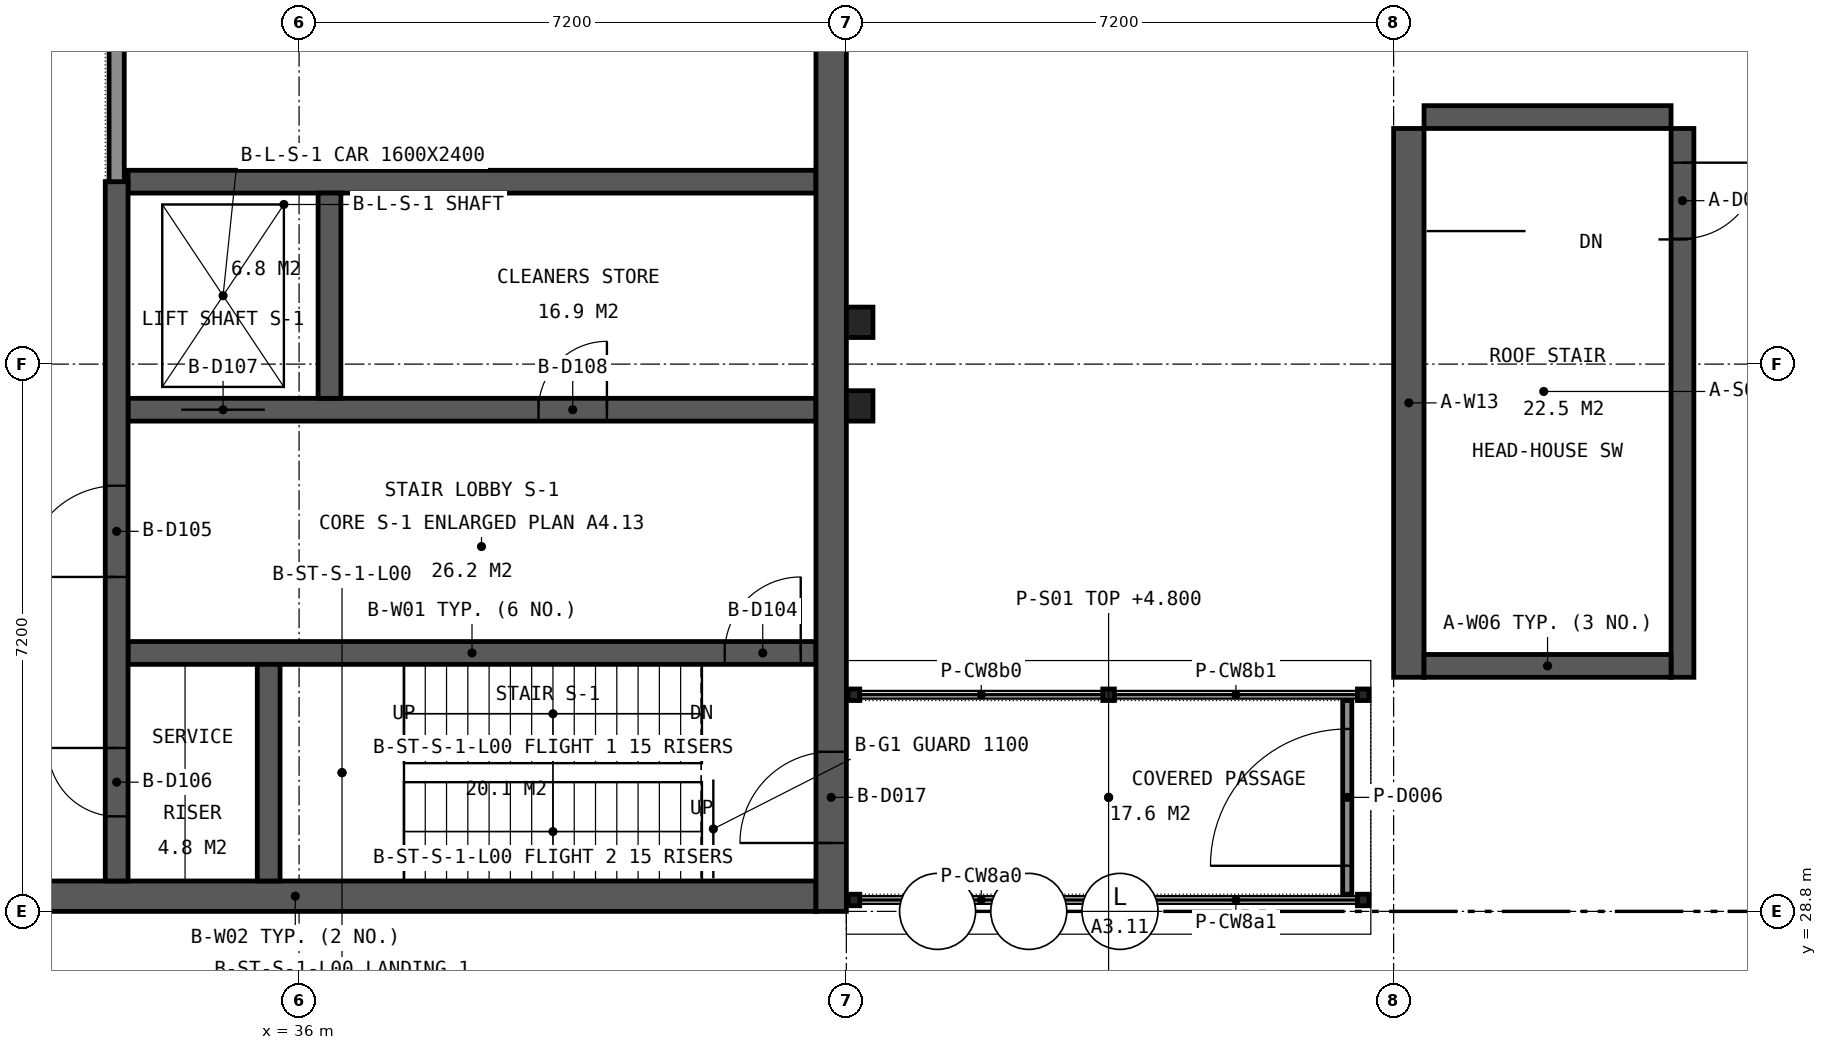
"""IFC4 building model, lengths in metres.
Left out: names, types, materials, properties, quantities, classifications, styles, units other than length and angle.
Written with IfcOpenShell. Run it as: python <this file> out.ifc"""

import sys

from ifc_helpers import new_model, si_unit, direction, frame, frame_2d, origin, origin_2d, place, context, subcontext, project, spatial, rectangle, hollow_rectangle, extrude, element, fill, save


model = new_model("IFC4")
c1 = context("Model", 3, precision=1e-05, world=origin(), true_north=direction((0.0, 1.0)))
c2 = subcontext(c1, "Body", "Model", "MODEL_VIEW")
j1 = project(units=[si_unit("LENGTHUNIT", "METRE"), si_unit("PLANEANGLEUNIT", "RADIAN")], contexts=[c1])
p1 = place(None, origin())
s1 = spatial("IfcSite", under=j1, at=p1, CompositionType="ELEMENT")
p2 = place(p1, origin())
s2 = spatial("IfcBuilding", under=s1, at=p2, CompositionType="ELEMENT")
p3 = place(p2, frame((0.0, 0.0, 4.8)))
s3 = spatial("IfcBuildingStorey", under=s2, at=p3, CompositionType="ELEMENT", Elevation=4.8)
p4 = place(p3, frame((50.6, 39.1, 0.0), z_axis=(0.0, 0.0, 1.0), x_axis=(0.0, -1.0, 0.0)))
e1 = element("IfcWall", 1, at=p4, inside=s3, PredefinedType="SHEAR", context=c2, shape_type="SweptSolid", body=[
    extrude(rectangle(XDim=7.22, YDim=0.4, at=frame_2d((3.61, 0.0))), origin(), (0.0, 0.0, 1.0), 2.5),
])
p5 = place(p3, frame((54.2, 39.1, 0.0), z_axis=(0.0, 0.0, 1.0), x_axis=(0.0, -1.0, 0.0)))
e2 = element("IfcWall", 2, at=p5, inside=s3, PredefinedType="SHEAR", context=c2, shape_type="SweptSolid", body=[
    extrude(rectangle(XDim=7.22, YDim=0.3, at=frame_2d((3.61, 0.0))), origin(), (0.0, 0.0, 1.0), 2.5),
])
p6 = place(p5, frame((0.45, 0.0, 0.0)))
e3 = element("IfcOpeningElement", 3, at=p6, cuts=e2, PredefinedType="OPENING", context=c2, shape_type="SweptSolid", body=[
    extrude(rectangle(XDim=1.0, YDim=2.1, at=frame_2d((0.5, 1.05))), frame((0.0, 0.16, 0.0), z_axis=(0.0, -1.0, 0.0), x_axis=(1.0, 0.0, 0.0)), (0.0, 0.0, 1.0), 0.32),
])
for number, where, z_axis, x_axis in (
    (4, (50.8, 32.03, 0.0), (0.0, 0.0, 1.0), (1.0, 0.0, 0.0)),
    (5, (50.8, 39.25, 0.0), (0.0, 0.0, 1.0), (1.0, 0.0, 0.0)),
):
    element("IfcWall", number, at=place(p3, frame(where, z_axis=z_axis, x_axis=x_axis)), inside=s3, PredefinedType="SHEAR", context=c2, shape_type="SweptSolid", body=[
        extrude(rectangle(XDim=3.25, YDim=0.3, at=frame_2d((1.625, 0.0))), origin(), (0.0, 0.0, 1.0), 2.5),
    ])
p7 = place(p3, frame((29.1, 29.0, 0.0), z_axis=(0.0, 0.0, 1.0), x_axis=(1.0, 0.0, 0.0)))
e6 = element("IfcWall", 6, at=p7, inside=s3, PredefinedType="SHEAR", context=c2, shape_type="SweptSolid", body=[
    extrude(rectangle(XDim=13.7, YDim=0.4, at=frame_2d((6.85, 0.0))), origin(), (0.0, 0.0, 1.0), 4.55),
])
p8 = place(p3, frame((33.75, 32.2, 0.0), z_axis=(0.0, 0.0, 1.0), x_axis=(1.0, 0.0, 0.0)))
e7 = element("IfcWall", 7, at=p8, inside=s3, PredefinedType="SHEAR", context=c2, shape_type="SweptSolid", body=[
    extrude(rectangle(XDim=9.05, YDim=0.3, at=frame_2d((4.525, 0.0))), origin(), (0.0, 0.0, 1.0), 4.55),
])
p9 = place(p8, frame((7.85, 0.0, 0.0)))
e8 = element("IfcOpeningElement", 8, at=p9, cuts=e7, PredefinedType="OPENING", context=c2, shape_type="SweptSolid", body=[
    extrude(rectangle(XDim=1.0, YDim=2.1, at=frame_2d((0.5, 1.05))), frame((0.0, 0.16, 0.0), z_axis=(0.0, -1.0, 0.0), x_axis=(1.0, 0.0, 0.0)), (0.0, 0.0, 1.0), 0.32),
])
p10 = place(p3, frame((33.75, 35.4, 0.0), z_axis=(0.0, 0.0, 1.0), x_axis=(1.0, 0.0, 0.0)))
e9 = element("IfcWall", 9, at=p10, inside=s3, PredefinedType="SHEAR", context=c2, shape_type="SweptSolid", body=[
    extrude(rectangle(XDim=9.05, YDim=0.3, at=frame_2d((4.525, 0.0))), origin(), (0.0, 0.0, 1.0), 4.55),
])
p11 = place(p10, frame((0.7, 0.0, 0.0)))
e10 = element("IfcOpeningElement", 10, at=p11, cuts=e9, PredefinedType="OPENING", context=c2, shape_type="SweptSolid", body=[
    extrude(rectangle(XDim=1.1, YDim=2.1, at=frame_2d((0.55, 1.05))), frame((0.0, 0.16, 0.0), z_axis=(0.0, -1.0, 0.0), x_axis=(1.0, 0.0, 0.0)), (0.0, 0.0, 1.0), 0.32),
])
p12 = place(p10, frame((5.4, 0.0, 0.0)))
e11 = element("IfcOpeningElement", 11, at=p12, cuts=e9, PredefinedType="OPENING", context=c2, shape_type="SweptSolid", body=[
    extrude(rectangle(XDim=0.9, YDim=2.1, at=frame_2d((0.45, 1.05))), frame((0.0, 0.16, 0.0), z_axis=(0.0, -1.0, 0.0), x_axis=(1.0, 0.0, 0.0)), (0.0, 0.0, 1.0), 0.32),
])
p13 = place(p3, frame((33.75, 38.4, 0.0), z_axis=(0.0, 0.0, 1.0), x_axis=(1.0, 0.0, 0.0)))
e12 = element("IfcWall", 12, at=p13, inside=s3, PredefinedType="SHEAR", context=c2, shape_type="SweptSolid", body=[
    extrude(rectangle(XDim=9.05, YDim=0.3, at=frame_2d((4.525, 0.0))), origin(), (0.0, 0.0, 1.0), 4.55),
])
p14 = place(p3, frame((33.6, 29.2, 0.0), z_axis=(0.0, 0.0, 1.0), x_axis=(0.0, 1.0, 0.0)))
e13 = element("IfcWall", 13, at=p14, inside=s3, PredefinedType="SHEAR", context=c2, shape_type="SweptSolid", body=[
    extrude(rectangle(XDim=9.2, YDim=0.3, at=frame_2d((4.6, 0.0))), origin(), (0.0, 0.0, 1.0), 4.55),
])
p15 = place(p14, frame((4.0, 0.0, 0.0)))
e14 = element("IfcOpeningElement", 14, at=p15, cuts=e13, PredefinedType="OPENING", context=c2, shape_type="SweptSolid", body=[
    extrude(rectangle(XDim=1.2, YDim=2.1, at=frame_2d((0.6, 1.05))), frame((0.0, 0.16, 0.0), z_axis=(0.0, -1.0, 0.0), x_axis=(1.0, 0.0, 0.0)), (0.0, 0.0, 1.0), 0.32),
])
p16 = place(p14, frame((0.85, 0.0, 0.0)))
e15 = element("IfcOpeningElement", 15, at=p16, cuts=e13, PredefinedType="OPENING", context=c2, shape_type="SweptSolid", body=[
    extrude(rectangle(XDim=0.9, YDim=2.1, at=frame_2d((0.45, 1.05))), frame((0.0, 0.16, 0.0), z_axis=(0.0, -1.0, 0.0), x_axis=(1.0, 0.0, 0.0)), (0.0, 0.0, 1.0), 0.32),
])
p17 = place(p3, frame((35.6, 29.2, 0.0), z_axis=(0.0, 0.0, 1.0), x_axis=(0.0, 1.0, 0.0)))
e16 = element("IfcWall", 16, at=p17, inside=s3, PredefinedType="SHEAR", context=c2, shape_type="SweptSolid", body=[
    extrude(rectangle(XDim=2.85, YDim=0.3, at=frame_2d((1.425, 0.0))), origin(), (0.0, 0.0, 1.0), 4.55),
])
p18 = place(p3, frame((36.4, 35.55, 0.0), z_axis=(0.0, 0.0, 1.0), x_axis=(0.0, 1.0, 0.0)))
e17 = element("IfcWall", 17, at=p18, inside=s3, PredefinedType="SHEAR", context=c2, shape_type="SweptSolid", body=[
    extrude(rectangle(XDim=2.7, YDim=0.3, at=frame_2d((1.35, 0.0))), origin(), (0.0, 0.0, 1.0), 4.55),
])
p19 = place(p3, frame((43.0, 28.8, 0.0), z_axis=(0.0, 0.0, 1.0), x_axis=(0.0, 1.0, 0.0)))
e18 = element("IfcWall", 18, at=p19, inside=s3, PredefinedType="SHEAR", context=c2, shape_type="SweptSolid", body=[
    extrude(rectangle(XDim=14.1, YDim=0.4, at=frame_2d((7.05, 0.0))), origin(), (0.0, 0.0, 1.0), 4.55),
])
p20 = place(p19, frame((0.9, 0.0, 0.0)))
e19 = element("IfcOpeningElement", 19, at=p20, cuts=e18, PredefinedType="OPENING", context=c2, shape_type="SweptSolid", body=[
    extrude(rectangle(XDim=1.2, YDim=2.1, at=frame_2d((0.6, 1.05))), frame((0.0, 0.21, 0.0), z_axis=(0.0, -1.0, 0.0), x_axis=(1.0, 0.0, 0.0)), (0.0, 0.0, 1.0), 0.42),
])
for number, where, z_axis, x_axis in (
    (20, (43.3, 28.95, 0.0), (0.0, 0.0, 1.0), (1.0, 0.0, 0.0)),
    (21, (46.65, 28.95, 0.0), (0.0, 0.0, 1.0), (1.0, 0.0, 0.0)),
    (22, (50.0, 28.95, 0.0), (0.0, 0.0, 1.0), (1.0, 0.0, 0.0)),
    (23, (43.3, 31.65, 0.0), (0.0, 0.0, 1.0), (1.0, 0.0, 0.0)),
    (24, (46.65, 31.65, 0.0), (0.0, 0.0, 1.0), (1.0, 0.0, 0.0)),
    (25, (50.0, 31.65, 0.0), (0.0, 0.0, 1.0), (1.0, 0.0, 0.0)),
):
    element("IfcColumn", number, at=place(p3, frame(where, z_axis=z_axis, x_axis=x_axis)), inside=s3, PredefinedType="COLUMN", context=c2, shape_type="SweptSolid", body=[
        extrude(hollow_rectangle(XDim=0.152, YDim=0.152, WallThickness=0.01, at=origin_2d()), origin(), (0.0, 0.0, 1.0), 2.753),
    ])
for number, where, z_axis, x_axis in (
    (26, (43.375, 35.45, 0.0), (0.0, 0.0, 1.0), (1.0, 0.0, 0.0)),
    (27, (43.375, 36.55, 0.0), (0.0, 0.0, 1.0), (1.0, 0.0, 0.0)),
):
    element("IfcColumn", number, at=place(p3, frame(where, z_axis=z_axis, x_axis=x_axis)), inside=s3, PredefinedType="COLUMN", context=c2, shape_type="SweptSolid", body=[
        extrude(rectangle(XDim=0.35, YDim=0.4, at=origin_2d()), origin(), (0.0, 0.0, 1.0), 4.8),
    ])
p21 = place(p3, frame((49.79, 29.026, 0.0), z_axis=(0.0, 0.0, 1.0), x_axis=(0.0, 1.0, 0.0)))
e28 = element("IfcWall", 28, at=p21, inside=s3, PredefinedType="SOLIDWALL", context=c2, shape_type="SweptSolid", body=[
    extrude(rectangle(XDim=2.548, YDim=0.12, at=frame_2d((1.274, 0.0))), origin(), (0.0, 0.0, 1.0), 2.753),
])
p22 = place(p21, frame((0.374, 0.0, 0.0)))
e29 = element("IfcOpeningElement", 29, at=p22, cuts=e28, PredefinedType="OPENING", context=c2, shape_type="SweptSolid", body=[
    extrude(rectangle(XDim=1.8, YDim=2.4, at=frame_2d((0.9, 1.2))), frame((0.0, 0.07, 0.0), z_axis=(0.0, -1.0, 0.0), x_axis=(1.0, 0.0, 0.0)), (0.0, 0.0, 1.0), 0.14),
])
p23 = place(p3, frame((33.6, 38.4, 0.0), z_axis=(0.0, 0.0, 1.0), x_axis=(0.0, 1.0, 0.0)))
e30 = element("IfcWall", 30, at=p23, inside=s3, PredefinedType="PARTITIONING", context=c2, shape_type="SweptSolid", body=[
    extrude(rectangle(XDim=24.0, YDim=0.2, at=frame_2d((12.0, 0.0))), origin(), (0.0, 0.0, 1.0), 3.95),
])
p24 = place(p23, frame((5.1, 0.0, 0.0)))
e31 = element("IfcOpeningElement", 31, at=p24, cuts=e30, PredefinedType="OPENING", context=c2, shape_type="SweptSolid", body=[
    extrude(rectangle(XDim=1.8, YDim=2.1, at=frame_2d((0.9, 1.05))), frame((0.0, 0.11, 0.0), z_axis=(0.0, -1.0, 0.0), x_axis=(1.0, 0.0, 0.0)), (0.0, 0.0, 1.0), 0.22),
])
p25 = place(p23, frame((13.3, 0.0, 0.0)))
e32 = element("IfcOpeningElement", 32, at=p25, cuts=e30, PredefinedType="OPENING", context=c2, shape_type="SweptSolid", body=[
    extrude(rectangle(XDim=1.0, YDim=2.1, at=frame_2d((0.5, 1.05))), frame((0.0, 0.11, 0.0), z_axis=(0.0, -1.0, 0.0), x_axis=(1.0, 0.0, 0.0)), (0.0, 0.0, 1.0), 0.22),
])
p26 = place(p23, frame((18.9, 0.0, 0.0)))
e33 = element("IfcOpeningElement", 33, at=p26, cuts=e30, PredefinedType="OPENING", context=c2, shape_type="SweptSolid", body=[
    extrude(rectangle(XDim=1.8, YDim=2.1, at=frame_2d((0.9, 1.05))), frame((0.0, 0.11, 0.0), z_axis=(0.0, -1.0, 0.0), x_axis=(1.0, 0.0, 0.0)), (0.0, 0.0, 1.0), 0.22),
])
p27 = place(p20, origin())
e34 = element("IfcDoor", 34, at=p27, inside=s3, OperationType="SINGLE_SWING_LEFT", PredefinedType="DOOR", context=c2, shape_type="SweptSolid", body=[
    extrude(rectangle(XDim=1.2, YDim=2.1, at=frame_2d((0.6, 1.05))), frame((0.0, 0.025, 0.0), z_axis=(0.0, -1.0, 0.0), x_axis=(1.0, 0.0, 0.0)), (0.0, 0.0, 1.0), 0.05),
])
fill(e19, e34)
p28 = place(p22, origin())
e35 = element("IfcDoor", 35, at=p28, inside=s3, OperationType="DOUBLE_DOOR_DOUBLE_SWING", PredefinedType="DOOR", context=c2, shape_type="SweptSolid", body=[
    extrude(rectangle(XDim=1.8, YDim=2.4, at=frame_2d((0.9, 1.2))), frame((0.0, 0.025, 0.0), z_axis=(0.0, -1.0, 0.0), x_axis=(1.0, 0.0, 0.0)), (0.0, 0.0, 1.0), 0.05),
])
fill(e29, e35)
p29 = place(p6, origin())
e36 = element("IfcDoor", 36, at=p29, inside=s3, OperationType="SINGLE_SWING_LEFT", PredefinedType="DOOR", context=c2, shape_type="SweptSolid", body=[
    extrude(rectangle(XDim=1.0, YDim=2.1, at=frame_2d((0.5, 1.05))), frame((0.0, 0.025, 0.0), z_axis=(0.0, -1.0, 0.0), x_axis=(1.0, 0.0, 0.0)), (0.0, 0.0, 1.0), 0.05),
])
fill(e3, e36)
p30 = place(p9, origin())
e37 = element("IfcDoor", 37, at=p30, inside=s3, OperationType="SINGLE_SWING_RIGHT", PredefinedType="DOOR", context=c2, shape_type="SweptSolid", body=[
    extrude(rectangle(XDim=1.0, YDim=2.1, at=frame_2d((0.5, 1.05))), frame((0.0, 0.025, 0.0), z_axis=(0.0, -1.0, 0.0), x_axis=(1.0, 0.0, 0.0)), (0.0, 0.0, 1.0), 0.05),
])
fill(e8, e37)
p31 = place(p15, origin())
e38 = element("IfcDoor", 38, at=p31, inside=s3, OperationType="SINGLE_SWING_LEFT", PredefinedType="DOOR", context=c2, shape_type="SweptSolid", body=[
    extrude(rectangle(XDim=1.2, YDim=2.1, at=frame_2d((0.6, 1.05))), frame((0.0, 0.025, 0.0), z_axis=(0.0, -1.0, 0.0), x_axis=(1.0, 0.0, 0.0)), (0.0, 0.0, 1.0), 0.05),
])
fill(e14, e38)
p32 = place(p16, origin())
e39 = element("IfcDoor", 39, at=p32, inside=s3, OperationType="SINGLE_SWING_RIGHT", PredefinedType="DOOR", context=c2, shape_type="SweptSolid", body=[
    extrude(rectangle(XDim=0.9, YDim=2.1, at=frame_2d((0.45, 1.05))), frame((0.0, 0.025, 0.0), z_axis=(0.0, -1.0, 0.0), x_axis=(1.0, 0.0, 0.0)), (0.0, 0.0, 1.0), 0.05),
])
fill(e15, e39)
p33 = place(p11, origin())
e40 = element("IfcDoor", 40, at=p33, inside=s3, OperationType="SLIDING_TO_LEFT", PredefinedType="DOOR", context=c2, shape_type="SweptSolid", body=[
    extrude(rectangle(XDim=1.1, YDim=2.1, at=frame_2d((0.55, 1.05))), frame((0.0, 0.025, 0.0), z_axis=(0.0, -1.0, 0.0), x_axis=(1.0, 0.0, 0.0)), (0.0, 0.0, 1.0), 0.05),
])
fill(e10, e40)
p34 = place(p12, origin())
e41 = element("IfcDoor", 41, at=p34, inside=s3, OperationType="SINGLE_SWING_RIGHT", PredefinedType="DOOR", context=c2, shape_type="SweptSolid", body=[
    extrude(rectangle(XDim=0.9, YDim=2.1, at=frame_2d((0.45, 1.05))), frame((0.0, 0.025, 0.0), z_axis=(0.0, -1.0, 0.0), x_axis=(1.0, 0.0, 0.0)), (0.0, 0.0, 1.0), 0.05),
])
fill(e11, e41)
save(model, sys.argv[1])
